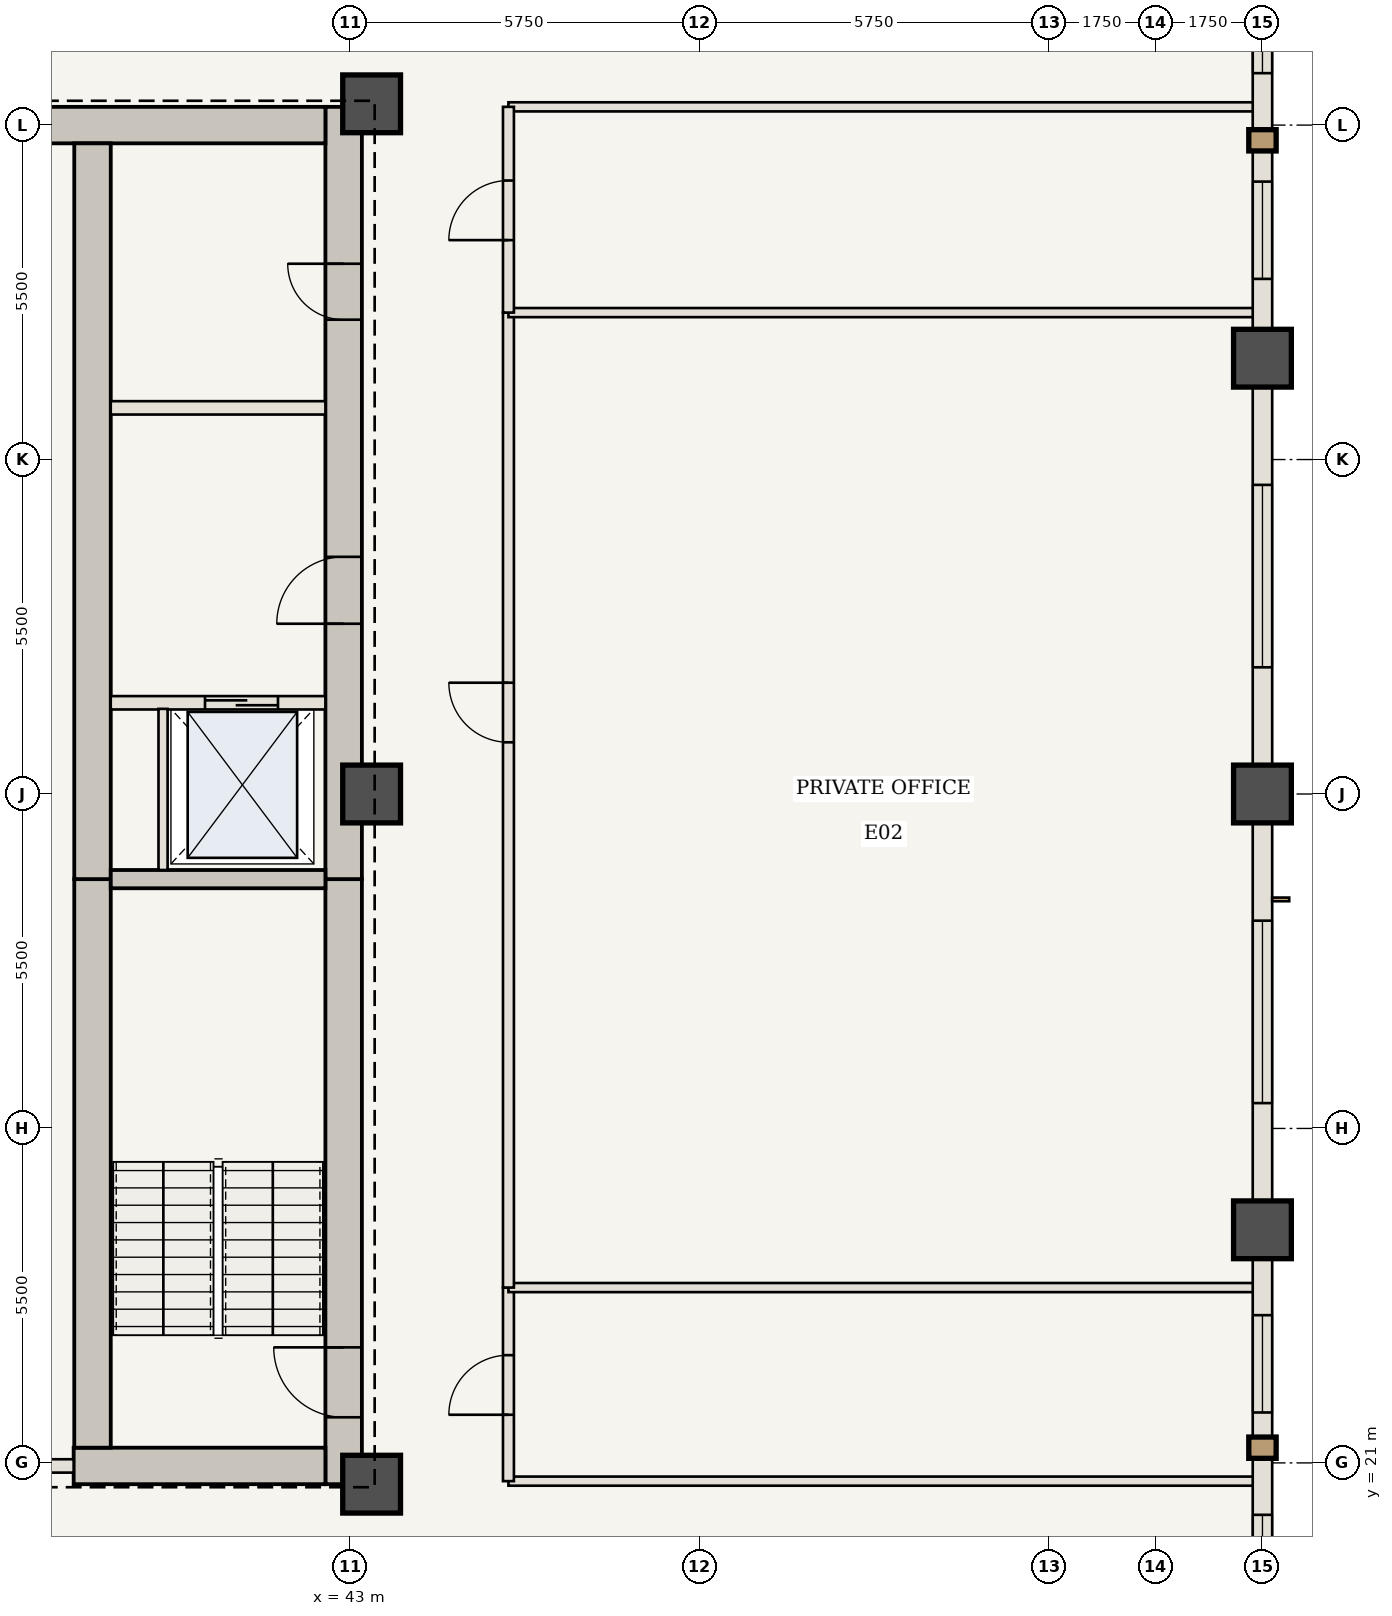
"""IFC4 building model, lengths in metres.
Left out: names, types, materials, properties, quantities, classifications, styles, units other than length and angle.
Written with IfcOpenShell. Run it as: python <this file> out.ifc"""

import sys

from ifc_helpers import new_model, si_unit, direction, frame, frame_2d, origin, origin_2d, place, context, subcontext, project, spatial, rectangle, extrude, element, fill, save


model = new_model("IFC4")
c1 = context("Model", 3, precision=1e-05, world=origin(), true_north=direction((0.0, 1.0)))
c2 = subcontext(c1, "Body", "Model", "MODEL_VIEW")
j1 = project(units=[si_unit("LENGTHUNIT", "METRE"), si_unit("PLANEANGLEUNIT", "RADIAN")], contexts=[c1])
p1 = place(None, origin())
s1 = spatial("IfcSite", under=j1, at=p1, CompositionType="ELEMENT")
p2 = place(p1, origin())
s2 = spatial("IfcBuilding", under=s1, at=p2, CompositionType="ELEMENT")
p3 = place(p2, frame((0.0, 0.0, 118.3)))
s3 = spatial("IfcBuildingStorey", under=s2, at=p3, CompositionType="ELEMENT", Elevation=118.3)
p4 = place(p3, frame((42.89, 20.65, 0.0), z_axis=(0.0, 0.0, 1.0), x_axis=(0.0, 1.0, 0.0)))
e1 = element("IfcWall", 1, at=p4, inside=s3, PredefinedType="SHEAR", context=c2, shape_type="SweptSolid", body=[
    extrude(rectangle(XDim=9.95, YDim=0.6, at=frame_2d((4.975, 0.0))), origin(), (0.0, 0.0, 1.0), 3.85),
])
p5 = place(p4, frame((1.1, 0.0, 0.0)))
e2 = element("IfcOpeningElement", 2, at=p5, cuts=e1, PredefinedType="OPENING", context=c2, shape_type="SweptSolid", body=[
    extrude(rectangle(XDim=1.15, YDim=2.15, at=frame_2d((0.575, 1.075))), frame((0.0, 0.31, 0.0), z_axis=(0.0, -1.0, 0.0), x_axis=(1.0, 0.0, 0.0)), (0.0, 0.0, 1.0), 0.62),
])
p6 = place(p3, frame((42.89, 30.6, 0.0), z_axis=(0.0, 0.0, 1.0), x_axis=(0.0, 1.0, 0.0)))
e3 = element("IfcWall", 3, at=p6, inside=s3, PredefinedType="SHEAR", context=c2, shape_type="SweptSolid", body=[
    extrude(rectangle(XDim=12.7, YDim=0.6, at=frame_2d((6.35, 0.0))), origin(), (0.0, 0.0, 1.0), 3.85),
])
p7 = place(p6, frame((4.2, 0.0, 0.0)))
e4 = element("IfcOpeningElement", 4, at=p7, cuts=e3, PredefinedType="OPENING", context=c2, shape_type="SweptSolid", body=[
    extrude(rectangle(XDim=1.1, YDim=2.15, at=frame_2d((0.55, 1.075))), frame((0.0, 0.31, 0.0), z_axis=(0.0, -1.0, 0.0), x_axis=(1.0, 0.0, 0.0)), (0.0, 0.0, 1.0), 0.62),
])
p8 = place(p6, frame((9.2, 0.0, 0.0)))
e5 = element("IfcOpeningElement", 5, at=p8, cuts=e3, PredefinedType="OPENING", context=c2, shape_type="SweptSolid", body=[
    extrude(rectangle(XDim=0.92, YDim=2.1, at=frame_2d((0.46, 1.05))), frame((0.0, 0.31, 0.0), z_axis=(0.0, -1.0, 0.0), x_axis=(1.0, 0.0, 0.0)), (0.0, 0.0, 1.0), 0.62),
])
p9 = place(p3, frame((38.45, 20.95, 0.0), z_axis=(0.0, 0.0, 1.0), x_axis=(1.0, 0.0, 0.0)))
e6 = element("IfcWall", 6, at=p9, inside=s3, PredefinedType="SHEAR", context=c2, shape_type="SweptSolid", body=[
    extrude(rectangle(XDim=4.14, YDim=0.6, at=frame_2d((2.07, 0.0))), origin(), (0.0, 0.0, 1.0), 3.85),
])
p10 = place(p3, frame((37.75, 43.0, 0.0), z_axis=(0.0, 0.0, 1.0), x_axis=(1.0, 0.0, 0.0)))
e7 = element("IfcWall", 7, at=p10, inside=s3, PredefinedType="SHEAR", context=c2, shape_type="SweptSolid", body=[
    extrude(rectangle(XDim=4.84, YDim=0.6, at=frame_2d((2.42, 0.0))), origin(), (0.0, 0.0, 1.0), 3.85),
])
p11 = place(p3, frame((38.76, 21.25, 0.0), z_axis=(0.0, 0.0, 1.0), x_axis=(0.0, 1.0, 0.0)))
e8 = element("IfcWall", 8, at=p11, inside=s3, PredefinedType="SHEAR", context=c2, shape_type="SweptSolid", body=[
    extrude(rectangle(XDim=9.35, YDim=0.6, at=frame_2d((4.675, 0.0))), origin(), (0.0, 0.0, 1.0), 3.85),
])
p12 = place(p3, frame((38.76, 30.6, 0.0), z_axis=(0.0, 0.0, 1.0), x_axis=(0.0, 1.0, 0.0)))
e9 = element("IfcWall", 9, at=p12, inside=s3, PredefinedType="SHEAR", context=c2, shape_type="SweptSolid", body=[
    extrude(rectangle(XDim=12.1, YDim=0.6, at=frame_2d((6.05, 0.0))), origin(), (0.0, 0.0, 1.0), 3.85),
])
for number, where, z_axis, x_axis in (
    (10, (43.35, 20.65, 0.0), (0.0, 0.0, 1.0), (1.0, 0.0, 0.0)),
    (11, (43.35, 32.0, 0.0), (0.0, 0.0, 1.0), (1.0, 0.0, 0.0)),
    (12, (43.35, 43.35, 0.0), (0.0, 0.0, 1.0), (1.0, 0.0, 0.0)),
    (13, (58.0, 24.833, 0.0), (0.0, 0.0, 1.0), (1.0, 0.0, 0.0)),
    (14, (58.0, 32.0, 0.0), (0.0, 0.0, 1.0), (1.0, 0.0, 0.0)),
    (15, (58.0, 39.167, 0.0), (0.0, 0.0, 1.0), (1.0, 0.0, 0.0)),
):
    element("IfcColumn", number, at=place(p3, frame(where, z_axis=z_axis, x_axis=x_axis)), inside=s3, PredefinedType="COLUMN", context=c2, shape_type="SweptSolid", body=[
        extrude(rectangle(XDim=0.95, YDim=0.95, at=origin_2d()), origin(), (0.0, 0.0, 1.0), 3.85),
    ])
p13 = place(p3, frame((39.06, 30.6, 0.0), z_axis=(0.0, 0.0, 1.0), x_axis=(1.0, 0.0, 0.0)))
e16 = element("IfcWall", 16, at=p13, inside=s3, PredefinedType="SHEAR", context=c2, shape_type="SweptSolid", body=[
    extrude(rectangle(XDim=3.53, YDim=0.3, at=frame_2d((1.765, 0.0))), origin(), (0.0, 0.0, 1.0), 3.685),
])
p14 = place(p3, frame((39.06, 33.5, 0.0), z_axis=(0.0, 0.0, 1.0), x_axis=(1.0, 0.0, 0.0)))
e17 = element("IfcWall", 17, at=p14, inside=s3, PredefinedType="STANDARD", context=c2, shape_type="SweptSolid", body=[
    extrude(rectangle(XDim=3.53, YDim=0.22, at=frame_2d((1.765, 0.0))), origin(), (0.0, 0.0, 1.0), 3.685),
])
p15 = place(p14, frame((1.55, 0.0, 0.0)))
e18 = element("IfcOpeningElement", 18, at=p15, cuts=e17, PredefinedType="OPENING", context=c2, shape_type="SweptSolid", body=[
    extrude(rectangle(XDim=1.2, YDim=2.2, at=frame_2d((0.6, 1.1))), frame((0.0, 0.12, 0.0), z_axis=(0.0, -1.0, 0.0), x_axis=(1.0, 0.0, 0.0)), (0.0, 0.0, 1.0), 0.24),
])
p16 = place(p3, frame((39.92, 30.75, 0.0), z_axis=(0.0, 0.0, 1.0), x_axis=(0.0, 1.0, 0.0)))
e19 = element("IfcWall", 19, at=p16, inside=s3, PredefinedType="STANDARD", context=c2, shape_type="SweptSolid", body=[
    extrude(rectangle(XDim=2.65, YDim=0.15, at=frame_2d((1.325, 0.0))), origin(), (0.0, 0.0, 1.0), 3.685),
])
p17 = place(p3, frame((39.06, 38.35, 0.0), z_axis=(0.0, 0.0, 1.0), x_axis=(1.0, 0.0, 0.0)))
e20 = element("IfcWall", 20, at=p17, inside=s3, PredefinedType="STANDARD", context=c2, shape_type="SweptSolid", body=[
    extrude(rectangle(XDim=3.53, YDim=0.22, at=frame_2d((1.765, 0.0))), origin(), (0.0, 0.0, 1.0), 3.685),
])
p18 = place(p3, frame((35.15, 20.95, 0.0), z_axis=(0.0, 0.0, 1.0), x_axis=(1.0, 0.0, 0.0)))
e21 = element("IfcWall", 21, at=p18, inside=s3, PredefinedType="STANDARD", context=c2, shape_type="SweptSolid", body=[
    extrude(rectangle(XDim=3.3, YDim=0.22, at=frame_2d((1.65, 0.0))), origin(), (0.0, 0.0, 1.0), 3.685),
])
p19 = place(p18, frame((1.1, 0.0, 0.0)))
e22 = element("IfcOpeningElement", 22, at=p19, cuts=e21, PredefinedType="OPENING", context=c2, shape_type="SweptSolid", body=[
    extrude(rectangle(XDim=1.1, YDim=2.15, at=frame_2d((0.55, 1.075))), frame((0.0, 0.12, 0.0), z_axis=(0.0, -1.0, 0.0), x_axis=(1.0, 0.0, 0.0)), (0.0, 0.0, 1.0), 0.24),
])
for number, where, z_axis, x_axis in (
    (23, (45.6, 20.7, 0.0), (0.0, 0.0, 1.0), (1.0, 0.0, 0.0)),
    (24, (45.6, 43.3, 0.0), (0.0, 0.0, 1.0), (1.0, 0.0, 0.0)),
):
    element("IfcWall", number, at=place(p3, frame(where, z_axis=z_axis, x_axis=x_axis)), inside=s3, PredefinedType="STANDARD", context=c2, shape_type="SweptSolid", body=[
        extrude(rectangle(XDim=12.34, YDim=0.15, at=frame_2d((6.17, 0.0))), origin(), (0.0, 0.0, 1.0), 3.065),
    ])
p20 = place(p3, frame((45.6, 20.7, 0.0), z_axis=(0.0, 0.0, 1.0), x_axis=(0.0, 1.0, 0.0)))
e25 = element("IfcWall", 25, at=p20, inside=s3, PredefinedType="STANDARD", context=c2, shape_type="SweptSolid", body=[
    extrude(rectangle(XDim=3.183, YDim=0.18, at=frame_2d((1.592, 0.0))), origin(), (0.0, 0.0, 1.0), 3.685),
])
p21 = place(p20, frame((1.092, 0.0, 0.0)))
e26 = element("IfcOpeningElement", 26, at=p21, cuts=e25, PredefinedType="OPENING", context=c2, shape_type="SweptSolid", body=[
    extrude(rectangle(XDim=0.98, YDim=2.2, at=frame_2d((0.49, 1.1))), frame((0.0, 0.1, 0.0), z_axis=(0.0, -1.0, 0.0), x_axis=(1.0, 0.0, 0.0)), (0.0, 0.0, 1.0), 0.2),
])
p22 = place(p3, frame((45.6, 23.883, 0.0), z_axis=(0.0, 0.0, 1.0), x_axis=(1.0, 0.0, 0.0)))
e27 = element("IfcWall", 27, at=p22, inside=s3, PredefinedType="STANDARD", context=c2, shape_type="SweptSolid", body=[
    extrude(rectangle(XDim=12.34, YDim=0.15, at=frame_2d((6.17, 0.0))), origin(), (0.0, 0.0, 1.0), 3.685),
])
p23 = place(p3, frame((45.6, 23.883, 0.0), z_axis=(0.0, 0.0, 1.0), x_axis=(0.0, 1.0, 0.0)))
e28 = element("IfcWall", 28, at=p23, inside=s3, PredefinedType="STANDARD", context=c2, shape_type="SweptSolid", body=[
    extrude(rectangle(XDim=16.033, YDim=0.18, at=frame_2d((8.017, 0.0))), origin(), (0.0, 0.0, 1.0), 3.685),
])
p24 = place(p23, frame((8.967, 0.0, 0.0)))
e29 = element("IfcOpeningElement", 29, at=p24, cuts=e28, PredefinedType="OPENING", context=c2, shape_type="SweptSolid", body=[
    extrude(rectangle(XDim=0.98, YDim=2.2, at=frame_2d((0.49, 1.1))), frame((0.0, 0.1, 0.0), z_axis=(0.0, -1.0, 0.0), x_axis=(1.0, 0.0, 0.0)), (0.0, 0.0, 1.0), 0.2),
])
p25 = place(p3, frame((45.6, 39.917, 0.0), z_axis=(0.0, 0.0, 1.0), x_axis=(1.0, 0.0, 0.0)))
e30 = element("IfcWall", 30, at=p25, inside=s3, PredefinedType="STANDARD", context=c2, shape_type="SweptSolid", body=[
    extrude(rectangle(XDim=12.34, YDim=0.15, at=frame_2d((6.17, 0.0))), origin(), (0.0, 0.0, 1.0), 3.685),
])
p26 = place(p3, frame((45.6, 39.917, 0.0), z_axis=(0.0, 0.0, 1.0), x_axis=(0.0, 1.0, 0.0)))
e31 = element("IfcWall", 31, at=p26, inside=s3, PredefinedType="STANDARD", context=c2, shape_type="SweptSolid", body=[
    extrude(rectangle(XDim=3.383, YDim=0.18, at=frame_2d((1.692, 0.0))), origin(), (0.0, 0.0, 1.0), 3.685),
])
p27 = place(p26, frame((1.192, 0.0, 0.0)))
e32 = element("IfcOpeningElement", 32, at=p27, cuts=e31, PredefinedType="OPENING", context=c2, shape_type="SweptSolid", body=[
    extrude(rectangle(XDim=0.98, YDim=2.2, at=frame_2d((0.49, 1.1))), frame((0.0, 0.1, 0.0), z_axis=(0.0, -1.0, 0.0), x_axis=(1.0, 0.0, 0.0)), (0.0, 0.0, 1.0), 0.2),
])
p28 = place(p3, frame((58.0, 24.833, 0.0), z_axis=(0.0, 0.0, 1.0), x_axis=(0.0, -1.0, 0.0)))
e33 = element("IfcWall", 33, at=p28, inside=s3, PredefinedType="USERDEFINED", context=c2, shape_type="SweptSolid", body=[
    extrude(rectangle(XDim=7.167, YDim=0.32, at=frame_2d((3.583, 0.0))), origin(), (0.0, 0.0, 1.0), 2.885),
])
p29 = place(p28, frame((1.404, 0.0, 0.85)))
e34 = element("IfcOpeningElement", 34, at=p29, cuts=e33, PredefinedType="OPENING", context=c2, shape_type="SweptSolid", body=[
    extrude(rectangle(XDim=1.6, YDim=1.835, at=frame_2d((0.8, 0.917))), frame((0.0, 0.17, 0.0), z_axis=(0.0, -1.0, 0.0), x_axis=(1.0, 0.0, 0.0)), (0.0, 0.0, 1.0), 0.34),
])
p30 = place(p28, frame((4.688, 0.0, 0.85)))
e35 = element("IfcOpeningElement", 35, at=p30, cuts=e33, PredefinedType="OPENING", context=c2, shape_type="SweptSolid", body=[
    extrude(rectangle(XDim=1.6, YDim=1.835, at=frame_2d((0.8, 0.917))), frame((0.0, 0.17, 0.0), z_axis=(0.0, -1.0, 0.0), x_axis=(1.0, 0.0, 0.0)), (0.0, 0.0, 1.0), 0.34),
])
p31 = place(p3, frame((58.0, 32.0, 0.0), z_axis=(0.0, 0.0, 1.0), x_axis=(0.0, -1.0, 0.0)))
e36 = element("IfcWall", 36, at=p31, inside=s3, PredefinedType="USERDEFINED", context=c2, shape_type="SweptSolid", body=[
    extrude(rectangle(XDim=7.167, YDim=0.32, at=frame_2d((3.583, 0.0))), origin(), (0.0, 0.0, 1.0), 2.885),
])
p32 = place(p31, frame((2.083, 0.0, 0.85)))
e37 = element("IfcOpeningElement", 37, at=p32, cuts=e36, PredefinedType="OPENING", context=c2, shape_type="SweptSolid", body=[
    extrude(rectangle(XDim=3.0, YDim=1.835, at=frame_2d((1.5, 0.917))), frame((0.0, 0.17, 0.0), z_axis=(0.0, -1.0, 0.0), x_axis=(1.0, 0.0, 0.0)), (0.0, 0.0, 1.0), 0.34),
])
p33 = place(p3, frame((58.0, 39.167, 0.0), z_axis=(0.0, 0.0, 1.0), x_axis=(0.0, -1.0, 0.0)))
e38 = element("IfcWall", 38, at=p33, inside=s3, PredefinedType="USERDEFINED", context=c2, shape_type="SweptSolid", body=[
    extrude(rectangle(XDim=7.167, YDim=0.32, at=frame_2d((3.583, 0.0))), origin(), (0.0, 0.0, 1.0), 2.885),
])
p34 = place(p33, frame((2.083, 0.0, 0.85)))
e39 = element("IfcOpeningElement", 39, at=p34, cuts=e38, PredefinedType="OPENING", context=c2, shape_type="SweptSolid", body=[
    extrude(rectangle(XDim=3.0, YDim=1.835, at=frame_2d((1.5, 0.917))), frame((0.0, 0.17, 0.0), z_axis=(0.0, -1.0, 0.0), x_axis=(1.0, 0.0, 0.0)), (0.0, 0.0, 1.0), 0.34),
])
p35 = place(p3, frame((58.0, 46.333, 0.0), z_axis=(0.0, 0.0, 1.0), x_axis=(0.0, -1.0, 0.0)))
e40 = element("IfcWall", 40, at=p35, inside=s3, PredefinedType="USERDEFINED", context=c2, shape_type="SweptSolid", body=[
    extrude(rectangle(XDim=7.167, YDim=0.32, at=frame_2d((3.583, 0.0))), origin(), (0.0, 0.0, 1.0), 2.885),
])
p36 = place(p35, frame((0.879, 0.0, 0.85)))
e41 = element("IfcOpeningElement", 41, at=p36, cuts=e40, PredefinedType="OPENING", context=c2, shape_type="SweptSolid", body=[
    extrude(rectangle(XDim=1.6, YDim=1.835, at=frame_2d((0.8, 0.917))), frame((0.0, 0.17, 0.0), z_axis=(0.0, -1.0, 0.0), x_axis=(1.0, 0.0, 0.0)), (0.0, 0.0, 1.0), 0.34),
])
p37 = place(p35, frame((4.262, 0.0, 0.85)))
e42 = element("IfcOpeningElement", 42, at=p37, cuts=e40, PredefinedType="OPENING", context=c2, shape_type="SweptSolid", body=[
    extrude(rectangle(XDim=1.6, YDim=1.835, at=frame_2d((0.8, 0.917))), frame((0.0, 0.17, 0.0), z_axis=(0.0, -1.0, 0.0), x_axis=(1.0, 0.0, 0.0)), (0.0, 0.0, 1.0), 0.34),
])
p38 = place(p5, origin())
e43 = element("IfcDoor", 43, at=p38, inside=s3, OperationType="SINGLE_SWING_RIGHT", PredefinedType="DOOR", context=c2, shape_type="SweptSolid", body=[
    extrude(rectangle(XDim=1.15, YDim=2.15, at=frame_2d((0.575, 1.075))), frame((0.0, 0.025, 0.0), z_axis=(0.0, -1.0, 0.0), x_axis=(1.0, 0.0, 0.0)), (0.0, 0.0, 1.0), 0.05),
])
fill(e2, e43)
p39 = place(p7, origin())
e44 = element("IfcDoor", 44, at=p39, inside=s3, OperationType="SINGLE_SWING_LEFT", PredefinedType="DOOR", context=c2, shape_type="SweptSolid", body=[
    extrude(rectangle(XDim=1.1, YDim=2.15, at=frame_2d((0.55, 1.075))), frame((0.0, 0.025, 0.0), z_axis=(0.0, -1.0, 0.0), x_axis=(1.0, 0.0, 0.0)), (0.0, 0.0, 1.0), 0.05),
])
fill(e4, e44)
p40 = place(p8, origin())
e45 = element("IfcDoor", 45, at=p40, inside=s3, OperationType="SINGLE_SWING_RIGHT", PredefinedType="DOOR", context=c2, shape_type="SweptSolid", body=[
    extrude(rectangle(XDim=0.92, YDim=2.1, at=frame_2d((0.46, 1.05))), frame((0.0, 0.025, 0.0), z_axis=(0.0, -1.0, 0.0), x_axis=(1.0, 0.0, 0.0)), (0.0, 0.0, 1.0), 0.05),
])
fill(e5, e45)
p41 = place(p15, origin())
e46 = element("IfcDoor", 46, at=p41, inside=s3, OperationType="DOUBLE_DOOR_SLIDING", PredefinedType="DOOR", context=c2, shape_type="SweptSolid", body=[
    extrude(rectangle(XDim=1.2, YDim=2.2, at=frame_2d((0.6, 1.1))), frame((0.0, 0.025, 0.0), z_axis=(0.0, -1.0, 0.0), x_axis=(1.0, 0.0, 0.0)), (0.0, 0.0, 1.0), 0.05),
])
fill(e18, e46)
p42 = place(p21, origin())
e47 = element("IfcDoor", 47, at=p42, inside=s3, OperationType="SINGLE_SWING_LEFT", PredefinedType="DOOR", context=c2, shape_type="SweptSolid", body=[
    extrude(rectangle(XDim=0.98, YDim=2.2, at=frame_2d((0.49, 1.1))), frame((0.0, 0.025, 0.0), z_axis=(0.0, -1.0, 0.0), x_axis=(1.0, 0.0, 0.0)), (0.0, 0.0, 1.0), 0.05),
])
fill(e26, e47)
p43 = place(p24, origin())
e48 = element("IfcDoor", 48, at=p43, inside=s3, OperationType="SINGLE_SWING_RIGHT", PredefinedType="DOOR", context=c2, shape_type="SweptSolid", body=[
    extrude(rectangle(XDim=0.98, YDim=2.2, at=frame_2d((0.49, 1.1))), frame((0.0, 0.025, 0.0), z_axis=(0.0, -1.0, 0.0), x_axis=(1.0, 0.0, 0.0)), (0.0, 0.0, 1.0), 0.05),
])
fill(e29, e48)
p44 = place(p27, origin())
e49 = element("IfcDoor", 49, at=p44, inside=s3, OperationType="SINGLE_SWING_LEFT", PredefinedType="DOOR", context=c2, shape_type="SweptSolid", body=[
    extrude(rectangle(XDim=0.98, YDim=2.2, at=frame_2d((0.49, 1.1))), frame((0.0, 0.025, 0.0), z_axis=(0.0, -1.0, 0.0), x_axis=(1.0, 0.0, 0.0)), (0.0, 0.0, 1.0), 0.05),
])
fill(e32, e49)
p45 = place(p29, origin())
e50 = element("IfcWindow", 50, at=p45, inside=s3, PartitioningType="SINGLE_PANEL", PredefinedType="WINDOW", context=c2, shape_type="SweptSolid", body=[
    extrude(rectangle(XDim=1.6, YDim=1.835, at=frame_2d((0.8, 0.917))), frame((0.0, 0.03, 0.0), z_axis=(0.0, -1.0, 0.0), x_axis=(1.0, 0.0, 0.0)), (0.0, 0.0, 1.0), 0.06),
])
fill(e34, e50)
p46 = place(p30, origin())
e51 = element("IfcWindow", 51, at=p46, inside=s3, PartitioningType="SINGLE_PANEL", PredefinedType="WINDOW", context=c2, shape_type="SweptSolid", body=[
    extrude(rectangle(XDim=1.6, YDim=1.835, at=frame_2d((0.8, 0.917))), frame((0.0, 0.03, 0.0), z_axis=(0.0, -1.0, 0.0), x_axis=(1.0, 0.0, 0.0)), (0.0, 0.0, 1.0), 0.06),
])
fill(e35, e51)
p47 = place(p32, origin())
e52 = element("IfcWindow", 52, at=p47, inside=s3, PartitioningType="SINGLE_PANEL", PredefinedType="WINDOW", context=c2, shape_type="SweptSolid", body=[
    extrude(rectangle(XDim=3.0, YDim=1.835, at=frame_2d((1.5, 0.917))), frame((0.0, 0.03, 0.0), z_axis=(0.0, -1.0, 0.0), x_axis=(1.0, 0.0, 0.0)), (0.0, 0.0, 1.0), 0.06),
])
fill(e37, e52)
p48 = place(p34, origin())
e53 = element("IfcWindow", 53, at=p48, inside=s3, PartitioningType="SINGLE_PANEL", PredefinedType="WINDOW", context=c2, shape_type="SweptSolid", body=[
    extrude(rectangle(XDim=3.0, YDim=1.835, at=frame_2d((1.5, 0.917))), frame((0.0, 0.03, 0.0), z_axis=(0.0, -1.0, 0.0), x_axis=(1.0, 0.0, 0.0)), (0.0, 0.0, 1.0), 0.06),
])
fill(e39, e53)
p49 = place(p36, origin())
e54 = element("IfcWindow", 54, at=p49, inside=s3, PartitioningType="SINGLE_PANEL", PredefinedType="WINDOW", context=c2, shape_type="SweptSolid", body=[
    extrude(rectangle(XDim=1.6, YDim=1.835, at=frame_2d((0.8, 0.917))), frame((0.0, 0.03, 0.0), z_axis=(0.0, -1.0, 0.0), x_axis=(1.0, 0.0, 0.0)), (0.0, 0.0, 1.0), 0.06),
])
fill(e41, e54)
p50 = place(p37, origin())
e55 = element("IfcWindow", 55, at=p50, inside=s3, PartitioningType="SINGLE_PANEL", PredefinedType="WINDOW", context=c2, shape_type="SweptSolid", body=[
    extrude(rectangle(XDim=1.6, YDim=1.835, at=frame_2d((0.8, 0.917))), frame((0.0, 0.03, 0.0), z_axis=(0.0, -1.0, 0.0), x_axis=(1.0, 0.0, 0.0)), (0.0, 0.0, 1.0), 0.06),
])
fill(e42, e55)
save(model, sys.argv[1])
